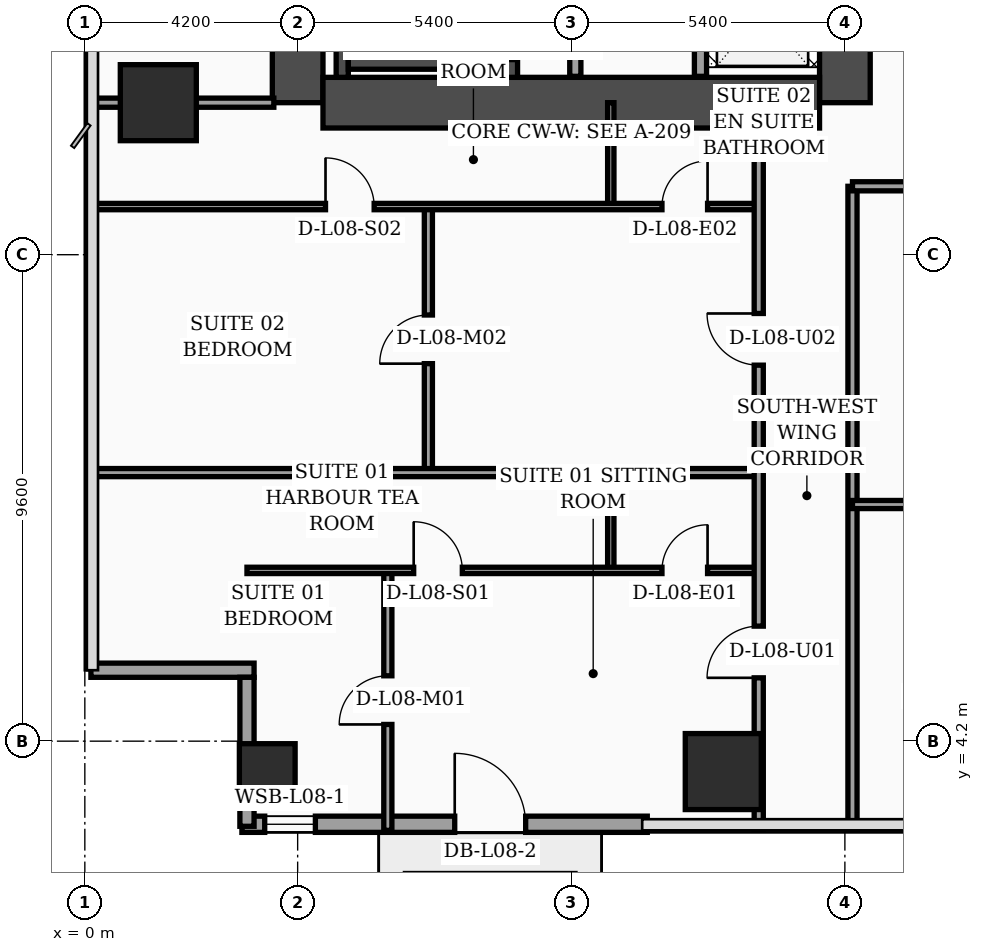
"""IFC4 building model, lengths in metres.
Left out: names, types, materials, properties, quantities, classifications, styles, units other than length and angle.
Written with IfcOpenShell. Run it as: python <this file> out.ifc"""

import sys

from ifc_helpers import new_model, si_unit, direction, frame, frame_2d, origin, origin_2d, place, context, subcontext, project, spatial, rectangle, hollow_rectangle, extrude, element, fill, save


model = new_model("IFC4")
c1 = context("Model", 3, precision=1e-05, world=origin(), true_north=direction((0.0, 1.0)))
c2 = subcontext(c1, "Body", "Model", "MODEL_VIEW")
j1 = project(units=[si_unit("LENGTHUNIT", "METRE"), si_unit("PLANEANGLEUNIT", "RADIAN")], contexts=[c1])
p1 = place(None, origin())
s1 = spatial("IfcSite", under=j1, at=p1, CompositionType="ELEMENT")
p2 = place(p1, origin())
s2 = spatial("IfcBuilding", under=s1, at=p2, CompositionType="ELEMENT")
p3 = place(p2, frame((0.0, 0.0, 38.4)))
s3 = spatial("IfcBuildingStorey", under=s2, at=p3, CompositionType="ELEMENT", Elevation=38.4)
p4 = place(p3, frame((4.2, 16.8, 0.0), z_axis=(0.0, 0.0, 1.0), x_axis=(0.0, 1.0, 0.0)))
e1 = element("IfcWall", 1, at=p4, inside=s3, PredefinedType="SHEAR", context=c2, shape_type="SweptSolid", body=[
    extrude(rectangle(XDim=21.6, YDim=1.0, at=frame_2d((10.8, 0.0))), origin(), (0.0, 0.0, 1.0), 3.56),
])
p5 = place(p3, frame((15.0, 16.8, 0.0), z_axis=(0.0, 0.0, 1.0), x_axis=(0.0, 1.0, 0.0)))
e2 = element("IfcWall", 2, at=p5, inside=s3, PredefinedType="SHEAR", context=c2, shape_type="SweptSolid", body=[
    extrude(rectangle(XDim=21.6, YDim=1.0, at=frame_2d((10.8, 0.0))), origin(), (0.0, 0.0, 1.0), 3.56),
])
p6 = place(p5, frame((8.65, 0.0, 0.0)))
e3 = element("IfcOpeningElement", 3, at=p6, cuts=e2, PredefinedType="OPENING", context=c2, shape_type="SweptSolid", body=[
    extrude(rectangle(XDim=1.1, YDim=2.2, at=frame_2d((0.55, 1.1))), frame((0.0, 0.51, 0.0), z_axis=(0.0, -1.0, 0.0), x_axis=(1.0, 0.0, 0.0)), (0.0, 0.0, 1.0), 1.02),
])
p7 = place(p5, frame((1.25, 0.0, 0.0)))
e4 = element("IfcOpeningElement", 4, at=p7, cuts=e2, PredefinedType="OPENING", context=c2, shape_type="SweptSolid", body=[
    extrude(rectangle(XDim=1.1, YDim=2.2, at=frame_2d((0.55, 1.1))), frame((0.0, 0.51, 0.0), z_axis=(0.0, -1.0, 0.0), x_axis=(1.0, 0.0, 0.0)), (0.0, 0.0, 1.0), 1.02),
])
p8 = place(p5, frame((3.8, 0.0, 0.0)))
e5 = element("IfcOpeningElement", 5, at=p8, cuts=e2, PredefinedType="OPENING", context=c2, shape_type="SweptSolid", body=[
    extrude(rectangle(XDim=1.1, YDim=2.2, at=frame_2d((0.55, 1.1))), frame((0.0, 0.51, 0.0), z_axis=(0.0, -1.0, 0.0), x_axis=(1.0, 0.0, 0.0)), (0.0, 0.0, 1.0), 1.02),
])
p9 = place(p5, frame((6.35, 0.0, 0.0)))
e6 = element("IfcOpeningElement", 6, at=p9, cuts=e2, PredefinedType="OPENING", context=c2, shape_type="SweptSolid", body=[
    extrude(rectangle(XDim=1.1, YDim=2.2, at=frame_2d((0.55, 1.1))), frame((0.0, 0.51, 0.0), z_axis=(0.0, -1.0, 0.0), x_axis=(1.0, 0.0, 0.0)), (0.0, 0.0, 1.0), 1.02),
])
p10 = place(p3, frame((4.7, 16.8, 0.0), z_axis=(0.0, 0.0, 1.0), x_axis=(1.0, 0.0, 0.0)))
e7 = element("IfcWall", 7, at=p10, inside=s3, PredefinedType="SHEAR", context=c2, shape_type="SweptSolid", body=[
    extrude(rectangle(XDim=9.8, YDim=1.0, at=frame_2d((4.9, 0.0))), origin(), (0.0, 0.0, 1.0), 3.56),
])
p11 = place(p3, frame((5.08, 17.3, 0.0), z_axis=(0.0, 0.0, 1.0), x_axis=(0.0, 1.0, 0.0)))
e8 = element("IfcWall", 8, at=p11, inside=s3, PredefinedType="SOLIDWALL", context=c2, shape_type="SweptSolid", body=[
    extrude(rectangle(XDim=9.49, YDim=0.24, at=frame_2d((4.745, 0.0))), origin(), (0.0, 0.0, 1.0), 3.56),
])
p12 = place(p3, frame((8.42, 17.3, 0.0), z_axis=(0.0, 0.0, 1.0), x_axis=(0.0, 1.0, 0.0)))
e9 = element("IfcWall", 9, at=p12, inside=s3, PredefinedType="SOLIDWALL", context=c2, shape_type="SweptSolid", body=[
    extrude(rectangle(XDim=9.49, YDim=0.24, at=frame_2d((4.745, 0.0))), origin(), (0.0, 0.0, 1.0), 3.56),
])
p13 = place(p12, frame((0.35, 0.0, 0.0)))
e10 = element("IfcOpeningElement", 10, at=p13, cuts=e9, PredefinedType="OPENING", context=c2, shape_type="SweptSolid", body=[
    extrude(rectangle(XDim=1.15, YDim=2.2, at=frame_2d((0.575, 1.1))), frame((0.0, 0.13, 0.0), z_axis=(0.0, -1.0, 0.0), x_axis=(1.0, 0.0, 0.0)), (0.0, 0.0, 1.0), 0.26),
])
p14 = place(p3, frame((5.2, 17.58, 0.0), z_axis=(0.0, 0.0, 1.0), x_axis=(1.0, 0.0, 0.0)))
e11 = element("IfcWall", 11, at=p14, inside=s3, PredefinedType="SOLIDWALL", context=c2, shape_type="SweptSolid", body=[
    extrude(rectangle(XDim=3.1, YDim=0.24, at=frame_2d((1.55, 0.0))), origin(), (0.0, 0.0, 1.0), 3.56),
])
p15 = place(p3, frame((3.6, 3.6, 0.0), z_axis=(0.0, 0.0, 1.0), x_axis=(1.0, 0.0, 0.0)))
e12 = element("IfcColumn", 12, at=p15, inside=s3, PredefinedType="COLUMN", context=c2, shape_type="SweptSolid", body=[
    extrude(hollow_rectangle(XDim=1.1, YDim=1.1, WallThickness=0.045, at=origin_2d()), origin(), (0.0, 0.0, 1.0), 3.56),
])
for number, where, z_axis, x_axis in (
    (13, (1.45, 16.8, 0.0), (0.0, 0.0, 1.0), (1.0, 0.0, 0.0)),
    (14, (12.6, 3.6, 0.0), (0.0, 0.0, 1.0), (1.0, 0.0, 0.0)),
):
    element("IfcColumn", number, at=place(p3, frame(where, z_axis=z_axis, x_axis=x_axis)), inside=s3, PredefinedType="COLUMN", context=c2, shape_type="SweptSolid", body=[
        extrude(rectangle(XDim=1.5, YDim=1.5, at=origin_2d()), origin(), (0.0, 0.0, 1.0), 3.56),
    ])
p16 = place(p3, frame((3.1, 2.56, 0.0), z_axis=(0.0, 0.0, 1.0), x_axis=(1.0, 0.0, 0.0)))
e15 = element("IfcWall", 15, at=p16, inside=s3, PredefinedType="SOLIDWALL", context=c2, shape_type="SweptSolid", body=[
    extrude(rectangle(XDim=8.0, YDim=0.32, at=frame_2d((4.0, 0.0))), origin(), (0.0, 0.0, 1.0), 3.56),
])
p17 = place(p16, frame((0.45, 0.0, 0.75)))
e16 = element("IfcOpeningElement", 16, at=p17, cuts=e15, PredefinedType="OPENING", context=c2, shape_type="SweptSolid", body=[
    extrude(rectangle(XDim=1.0, YDim=1.6, at=frame_2d((0.5, 0.8))), frame((0.0, 0.17, 0.0), z_axis=(0.0, -1.0, 0.0), x_axis=(1.0, 0.0, 0.0)), (0.0, 0.0, 1.0), 0.34),
])
p18 = place(p16, frame((4.2, 0.0, 0.0)))
e17 = element("IfcOpeningElement", 17, at=p18, cuts=e15, PredefinedType="OPENING", context=c2, shape_type="SweptSolid", body=[
    extrude(rectangle(XDim=1.4, YDim=2.25, at=frame_2d((0.7, 1.125))), frame((0.0, 0.17, 0.0), z_axis=(0.0, -1.0, 0.0), x_axis=(1.0, 0.0, 0.0)), (0.0, 0.0, 1.0), 0.34),
])
p19 = place(p3, frame((0.12, 5.6, 0.0), z_axis=(0.0, 0.0, 1.0), x_axis=(1.0, 0.0, 0.0)))
e18 = element("IfcWall", 18, at=p19, inside=s3, PredefinedType="SOLIDWALL", context=c2, shape_type="SweptSolid", body=[
    extrude(rectangle(XDim=3.22, YDim=0.28, at=frame_2d((1.61, 0.0))), origin(), (0.0, 0.0, 1.0), 2.84),
])
p20 = place(p3, frame((3.2, 5.46, 0.0), z_axis=(0.0, 0.0, 1.0), x_axis=(0.0, -1.0, 0.0)))
e19 = element("IfcWall", 19, at=p20, inside=s3, PredefinedType="SOLIDWALL", context=c2, shape_type="SweptSolid", body=[
    extrude(rectangle(XDim=2.94, YDim=0.28, at=frame_2d((1.47, 0.0))), origin(), (0.0, 0.0, 1.0), 2.84),
])
p21 = place(p3, frame((9.68, 17.32, 0.0), z_axis=(0.0, 0.0, 1.0), x_axis=(0.0, 1.0, 0.0)))
e20 = element("IfcWall", 20, at=p21, inside=s3, PredefinedType="SOLIDWALL", context=c2, shape_type="SweptSolid", body=[
    extrude(rectangle(XDim=7.68, YDim=0.22, at=frame_2d((3.84, 0.0))), origin(), (0.0, 0.0, 1.0), 3.56),
])
p22 = place(p3, frame((12.15, 17.32, 0.0), z_axis=(0.0, 0.0, 1.0), x_axis=(0.0, 1.0, 0.0)))
e21 = element("IfcWall", 21, at=p22, inside=s3, PredefinedType="SOLIDWALL", context=c2, shape_type="SweptSolid", body=[
    extrude(rectangle(XDim=7.65, YDim=0.24, at=frame_2d((3.825, 0.0))), origin(), (0.0, 0.0, 1.0), 3.56),
])
p23 = place(p3, frame((0.08, 16.8, 0.0), z_axis=(0.0, 0.0, 1.0), x_axis=(1.0, 0.0, 0.0)))
e22 = element("IfcWall", 22, at=p23, inside=s3, PredefinedType="PARTITIONING", context=c2, shape_type="SweptSolid", body=[
    extrude(rectangle(XDim=3.65, YDim=0.18, at=frame_2d((1.825, 0.0))), origin(), (0.0, 0.0, 1.0), 2.84),
])
p24 = place(p3, frame((10.38, 7.57, 0.0), z_axis=(0.0, 0.0, 1.0), x_axis=(0.0, 1.0, 0.0)))
e23 = element("IfcWall", 23, at=p24, inside=s3, PredefinedType="PARTITIONING", context=c2, shape_type="SweptSolid", body=[
    extrude(rectangle(XDim=1.93, YDim=0.125, at=frame_2d((0.965, 0.0))), origin(), (0.0, 0.0, 1.0), 3.56),
])
p25 = place(p3, frame((5.98, 2.44, 0.0), z_axis=(0.0, 0.0, 1.0), x_axis=(0.0, 1.0, 0.0)))
e24 = element("IfcWall", 24, at=p25, inside=s3, PredefinedType="PARTITIONING", context=c2, shape_type="SweptSolid", body=[
    extrude(rectangle(XDim=5.13, YDim=0.16, at=frame_2d((2.565, 0.0))), origin(), (0.0, 0.0, 1.0), 3.04),
])
p26 = place(p25, frame((2.09, 0.0, 0.0)))
e25 = element("IfcOpeningElement", 25, at=p26, cuts=e24, PredefinedType="OPENING", context=c2, shape_type="SweptSolid", body=[
    extrude(rectangle(XDim=0.96, YDim=2.2, at=frame_2d((0.48, 1.1))), frame((0.0, 0.09, 0.0), z_axis=(0.0, -1.0, 0.0), x_axis=(1.0, 0.0, 0.0)), (0.0, 0.0, 1.0), 0.18),
])
p27 = place(p3, frame((3.2, 7.57, 0.0), z_axis=(0.0, 0.0, 1.0), x_axis=(1.0, 0.0, 0.0)))
e26 = element("IfcWall", 26, at=p27, inside=s3, PredefinedType="PARTITIONING", context=c2, shape_type="SweptSolid", body=[
    extrude(rectangle(XDim=10.1, YDim=0.125, at=frame_2d((5.05, 0.0))), origin(), (0.0, 0.0, 1.0), 2.84),
])
p28 = place(p27, frame((3.29, 0.0, 0.0)))
e27 = element("IfcOpeningElement", 27, at=p28, cuts=e26, PredefinedType="OPENING", context=c2, shape_type="SweptSolid", body=[
    extrude(rectangle(XDim=0.96, YDim=2.2, at=frame_2d((0.48, 1.1))), frame((0.0, 0.073, 0.0), z_axis=(0.0, -1.0, 0.0), x_axis=(1.0, 0.0, 0.0)), (0.0, 0.0, 1.0), 0.145),
])
p29 = place(p27, frame((8.19, 0.0, 0.0)))
e28 = element("IfcOpeningElement", 28, at=p29, cuts=e26, PredefinedType="OPENING", context=c2, shape_type="SweptSolid", body=[
    extrude(rectangle(XDim=0.9, YDim=2.15, at=frame_2d((0.45, 1.075))), frame((0.0, 0.073, 0.0), z_axis=(0.0, -1.0, 0.0), x_axis=(1.0, 0.0, 0.0)), (0.0, 0.0, 1.0), 0.145),
])
p30 = place(p3, frame((10.38, 14.75, 0.0), z_axis=(0.0, 0.0, 1.0), x_axis=(0.0, 1.0, 0.0)))
e29 = element("IfcWall", 29, at=p30, inside=s3, PredefinedType="PARTITIONING", context=c2, shape_type="SweptSolid", body=[
    extrude(rectangle(XDim=2.05, YDim=0.125, at=frame_2d((1.025, 0.0))), origin(), (0.0, 0.0, 1.0), 3.56),
])
p31 = place(p3, frame((6.78, 9.5, 0.0), z_axis=(0.0, 0.0, 1.0), x_axis=(0.0, 1.0, 0.0)))
e30 = element("IfcWall", 30, at=p31, inside=s3, PredefinedType="PARTITIONING", context=c2, shape_type="SweptSolid", body=[
    extrude(rectangle(XDim=5.25, YDim=0.16, at=frame_2d((2.625, 0.0))), origin(), (0.0, 0.0, 1.0), 3.14),
])
p32 = place(p31, frame((2.15, 0.0, 0.0)))
e31 = element("IfcOpeningElement", 31, at=p32, cuts=e30, PredefinedType="OPENING", context=c2, shape_type="SweptSolid", body=[
    extrude(rectangle(XDim=0.96, YDim=2.2, at=frame_2d((0.48, 1.1))), frame((0.0, 0.09, 0.0), z_axis=(0.0, -1.0, 0.0), x_axis=(1.0, 0.0, 0.0)), (0.0, 0.0, 1.0), 0.18),
])
p33 = place(p3, frame((0.08, 14.75, 0.0), z_axis=(0.0, 0.0, 1.0), x_axis=(1.0, 0.0, 0.0)))
e32 = element("IfcWall", 32, at=p33, inside=s3, PredefinedType="PARTITIONING", context=c2, shape_type="SweptSolid", body=[
    extrude(rectangle(XDim=13.22, YDim=0.125, at=frame_2d((6.61, 0.0))), origin(), (0.0, 0.0, 1.0), 2.84),
])
p34 = place(p33, frame((4.67, 0.0, 0.0)))
e33 = element("IfcOpeningElement", 33, at=p34, cuts=e32, PredefinedType="OPENING", context=c2, shape_type="SweptSolid", body=[
    extrude(rectangle(XDim=0.96, YDim=2.2, at=frame_2d((0.48, 1.1))), frame((0.0, 0.073, 0.0), z_axis=(0.0, -1.0, 0.0), x_axis=(1.0, 0.0, 0.0)), (0.0, 0.0, 1.0), 0.145),
])
p35 = place(p33, frame((11.31, 0.0, 0.0)))
e34 = element("IfcOpeningElement", 34, at=p35, cuts=e32, PredefinedType="OPENING", context=c2, shape_type="SweptSolid", body=[
    extrude(rectangle(XDim=0.9, YDim=2.15, at=frame_2d((0.45, 1.075))), frame((0.0, 0.073, 0.0), z_axis=(0.0, -1.0, 0.0), x_axis=(1.0, 0.0, 0.0)), (0.0, 0.0, 1.0), 0.145),
])
p36 = place(p3, frame((0.08, 9.5, 0.0), z_axis=(0.0, 0.0, 1.0), x_axis=(1.0, 0.0, 0.0)))
e35 = element("IfcWall", 35, at=p36, inside=s3, PredefinedType="PARTITIONING", context=c2, shape_type="SweptSolid", body=[
    extrude(rectangle(XDim=13.22, YDim=0.16, at=frame_2d((6.61, 0.0))), origin(), (0.0, 0.0, 1.0), 2.84),
])
p37 = place(p3, frame((13.3, 2.44, 0.0), z_axis=(0.0, 0.0, 1.0), x_axis=(0.0, 1.0, 0.0)))
e36 = element("IfcWall", 36, at=p37, inside=s3, PredefinedType="PARTITIONING", context=c2, shape_type="SweptSolid", body=[
    extrude(rectangle(XDim=14.36, YDim=0.18, at=frame_2d((7.18, 0.0))), origin(), (0.0, 0.0, 1.0), 3.04),
])
p38 = place(p37, frame((3.01, 0.0, 0.0)))
e37 = element("IfcOpeningElement", 37, at=p38, cuts=e36, PredefinedType="OPENING", context=c2, shape_type="SweptSolid", body=[
    extrude(rectangle(XDim=1.02, YDim=2.2, at=frame_2d((0.51, 1.1))), frame((0.0, 0.1, 0.0), z_axis=(0.0, -1.0, 0.0), x_axis=(1.0, 0.0, 0.0)), (0.0, 0.0, 1.0), 0.2),
])
p39 = place(p37, frame((9.18, 0.0, 0.0)))
e38 = element("IfcOpeningElement", 38, at=p39, cuts=e36, PredefinedType="OPENING", context=c2, shape_type="SweptSolid", body=[
    extrude(rectangle(XDim=1.02, YDim=2.2, at=frame_2d((0.51, 1.1))), frame((0.0, 0.1, 0.0), z_axis=(0.0, -1.0, 0.0), x_axis=(1.0, 0.0, 0.0)), (0.0, 0.0, 1.0), 0.2),
])
p40 = place(p3, frame((15.15, 2.44, 0.0), z_axis=(0.0, 0.0, 1.0), x_axis=(0.0, 1.0, 0.0)))
e39 = element("IfcWall", 39, at=p40, inside=s3, PredefinedType="PARTITIONING", context=c2, shape_type="SweptSolid", body=[
    extrude(rectangle(XDim=12.71, YDim=0.18, at=frame_2d((6.355, 0.0))), origin(), (0.0, 0.0, 1.0), 3.04),
])
p41 = place(p3, frame((15.15, 8.87, 0.0), z_axis=(0.0, 0.0, 1.0), x_axis=(1.0, 0.0, 0.0)))
e40 = element("IfcWall", 40, at=p41, inside=s3, PredefinedType="PARTITIONING", context=c2, shape_type="SweptSolid", body=[
    extrude(rectangle(XDim=4.45, YDim=0.16, at=frame_2d((2.225, 0.0))), origin(), (0.0, 0.0, 1.0), 3.56),
])
p42 = place(p41, frame((1.75, 0.0, 0.0)))
e41 = element("IfcOpeningElement", 41, at=p42, cuts=e40, PredefinedType="OPENING", context=c2, shape_type="SweptSolid", body=[
    extrude(rectangle(XDim=0.96, YDim=2.2, at=frame_2d((0.48, 1.1))), frame((0.0, 0.09, 0.0), z_axis=(0.0, -1.0, 0.0), x_axis=(1.0, 0.0, 0.0)), (0.0, 0.0, 1.0), 0.18),
])
p43 = place(p3, frame((15.15, 15.15, 0.0), z_axis=(0.0, 0.0, 1.0), x_axis=(1.0, 0.0, 0.0)))
e42 = element("IfcWall", 42, at=p43, inside=s3, PredefinedType="PARTITIONING", context=c2, shape_type="SweptSolid", body=[
    extrude(rectangle(XDim=6.45, YDim=0.18, at=frame_2d((3.225, 0.0))), origin(), (0.0, 0.0, 1.0), 2.34),
])
p44 = place(p43, frame((1.74, 0.0, 0.0)))
e43 = element("IfcOpeningElement", 43, at=p44, cuts=e42, PredefinedType="OPENING", context=c2, shape_type="SweptSolid", body=[
    extrude(rectangle(XDim=1.02, YDim=2.2, at=frame_2d((0.51, 1.1))), frame((0.0, 0.1, 0.0), z_axis=(0.0, -1.0, 0.0), x_axis=(1.0, 0.0, 0.0)), (0.0, 0.0, 1.0), 0.2),
])
p45 = place(p17, origin())
e44 = element("IfcWindow", 44, at=p45, inside=s3, PartitioningType="SINGLE_PANEL", PredefinedType="WINDOW", context=c2, shape_type="SweptSolid", body=[
    extrude(rectangle(XDim=1.0, YDim=1.6, at=frame_2d((0.5, 0.8))), frame((0.0, 0.03, 0.0), z_axis=(0.0, -1.0, 0.0), x_axis=(1.0, 0.0, 0.0)), (0.0, 0.0, 1.0), 0.06),
])
fill(e16, e44)
p46 = place(p18, origin())
e45 = element("IfcDoor", 45, at=p46, inside=s3, OperationType="SINGLE_SWING_LEFT", PredefinedType="DOOR", context=c2, shape_type="SweptSolid", body=[
    extrude(rectangle(XDim=1.4, YDim=2.25, at=frame_2d((0.7, 1.125))), frame((0.0, 0.025, 0.0), z_axis=(0.0, -1.0, 0.0), x_axis=(1.0, 0.0, 0.0)), (0.0, 0.0, 1.0), 0.05),
])
fill(e17, e45)
p47 = place(p26, origin())
e46 = element("IfcDoor", 46, at=p47, inside=s3, OperationType="SINGLE_SWING_LEFT", PredefinedType="DOOR", context=c2, shape_type="SweptSolid", body=[
    extrude(rectangle(XDim=0.96, YDim=2.2, at=frame_2d((0.48, 1.1))), frame((0.0, 0.025, 0.0), z_axis=(0.0, -1.0, 0.0), x_axis=(1.0, 0.0, 0.0)), (0.0, 0.0, 1.0), 0.05),
])
fill(e25, e46)
p48 = place(p28, origin())
e47 = element("IfcDoor", 47, at=p48, inside=s3, OperationType="SINGLE_SWING_LEFT", PredefinedType="DOOR", context=c2, shape_type="SweptSolid", body=[
    extrude(rectangle(XDim=0.96, YDim=2.2, at=frame_2d((0.48, 1.1))), frame((0.0, 0.025, 0.0), z_axis=(0.0, -1.0, 0.0), x_axis=(1.0, 0.0, 0.0)), (0.0, 0.0, 1.0), 0.05),
])
fill(e27, e47)
p49 = place(p29, origin())
e48 = element("IfcDoor", 48, at=p49, inside=s3, OperationType="SINGLE_SWING_RIGHT", PredefinedType="DOOR", context=c2, shape_type="SweptSolid", body=[
    extrude(rectangle(XDim=0.9, YDim=2.15, at=frame_2d((0.45, 1.075))), frame((0.0, 0.025, 0.0), z_axis=(0.0, -1.0, 0.0), x_axis=(1.0, 0.0, 0.0)), (0.0, 0.0, 1.0), 0.05),
])
fill(e28, e48)
p50 = place(p32, origin())
e49 = element("IfcDoor", 49, at=p50, inside=s3, OperationType="SINGLE_SWING_LEFT", PredefinedType="DOOR", context=c2, shape_type="SweptSolid", body=[
    extrude(rectangle(XDim=0.96, YDim=2.2, at=frame_2d((0.48, 1.1))), frame((0.0, 0.025, 0.0), z_axis=(0.0, -1.0, 0.0), x_axis=(1.0, 0.0, 0.0)), (0.0, 0.0, 1.0), 0.05),
])
fill(e31, e49)
p51 = place(p34, origin())
e50 = element("IfcDoor", 50, at=p51, inside=s3, OperationType="SINGLE_SWING_LEFT", PredefinedType="DOOR", context=c2, shape_type="SweptSolid", body=[
    extrude(rectangle(XDim=0.96, YDim=2.2, at=frame_2d((0.48, 1.1))), frame((0.0, 0.025, 0.0), z_axis=(0.0, -1.0, 0.0), x_axis=(1.0, 0.0, 0.0)), (0.0, 0.0, 1.0), 0.05),
])
fill(e33, e50)
p52 = place(p35, origin())
e51 = element("IfcDoor", 51, at=p52, inside=s3, OperationType="SINGLE_SWING_RIGHT", PredefinedType="DOOR", context=c2, shape_type="SweptSolid", body=[
    extrude(rectangle(XDim=0.9, YDim=2.15, at=frame_2d((0.45, 1.075))), frame((0.0, 0.025, 0.0), z_axis=(0.0, -1.0, 0.0), x_axis=(1.0, 0.0, 0.0)), (0.0, 0.0, 1.0), 0.05),
])
fill(e34, e51)
p53 = place(p38, origin())
e52 = element("IfcDoor", 52, at=p53, inside=s3, OperationType="SINGLE_SWING_LEFT", PredefinedType="DOOR", context=c2, shape_type="SweptSolid", body=[
    extrude(rectangle(XDim=1.02, YDim=2.2, at=frame_2d((0.51, 1.1))), frame((0.0, 0.025, 0.0), z_axis=(0.0, -1.0, 0.0), x_axis=(1.0, 0.0, 0.0)), (0.0, 0.0, 1.0), 0.05),
])
fill(e37, e52)
p54 = place(p39, origin())
e53 = element("IfcDoor", 53, at=p54, inside=s3, OperationType="SINGLE_SWING_RIGHT", PredefinedType="DOOR", context=c2, shape_type="SweptSolid", body=[
    extrude(rectangle(XDim=1.02, YDim=2.2, at=frame_2d((0.51, 1.1))), frame((0.0, 0.025, 0.0), z_axis=(0.0, -1.0, 0.0), x_axis=(1.0, 0.0, 0.0)), (0.0, 0.0, 1.0), 0.05),
])
fill(e38, e53)
p55 = place(p13, origin())
e54 = element("IfcDoor", 54, at=p55, inside=s3, OperationType="SINGLE_SWING_LEFT", PredefinedType="DOOR", context=c2, shape_type="SweptSolid", body=[
    extrude(rectangle(XDim=1.15, YDim=2.2, at=frame_2d((0.575, 1.1))), frame((0.0, 0.025, 0.0), z_axis=(0.0, -1.0, 0.0), x_axis=(1.0, 0.0, 0.0)), (0.0, 0.0, 1.0), 0.05),
])
fill(e10, e54)
save(model, sys.argv[1])
